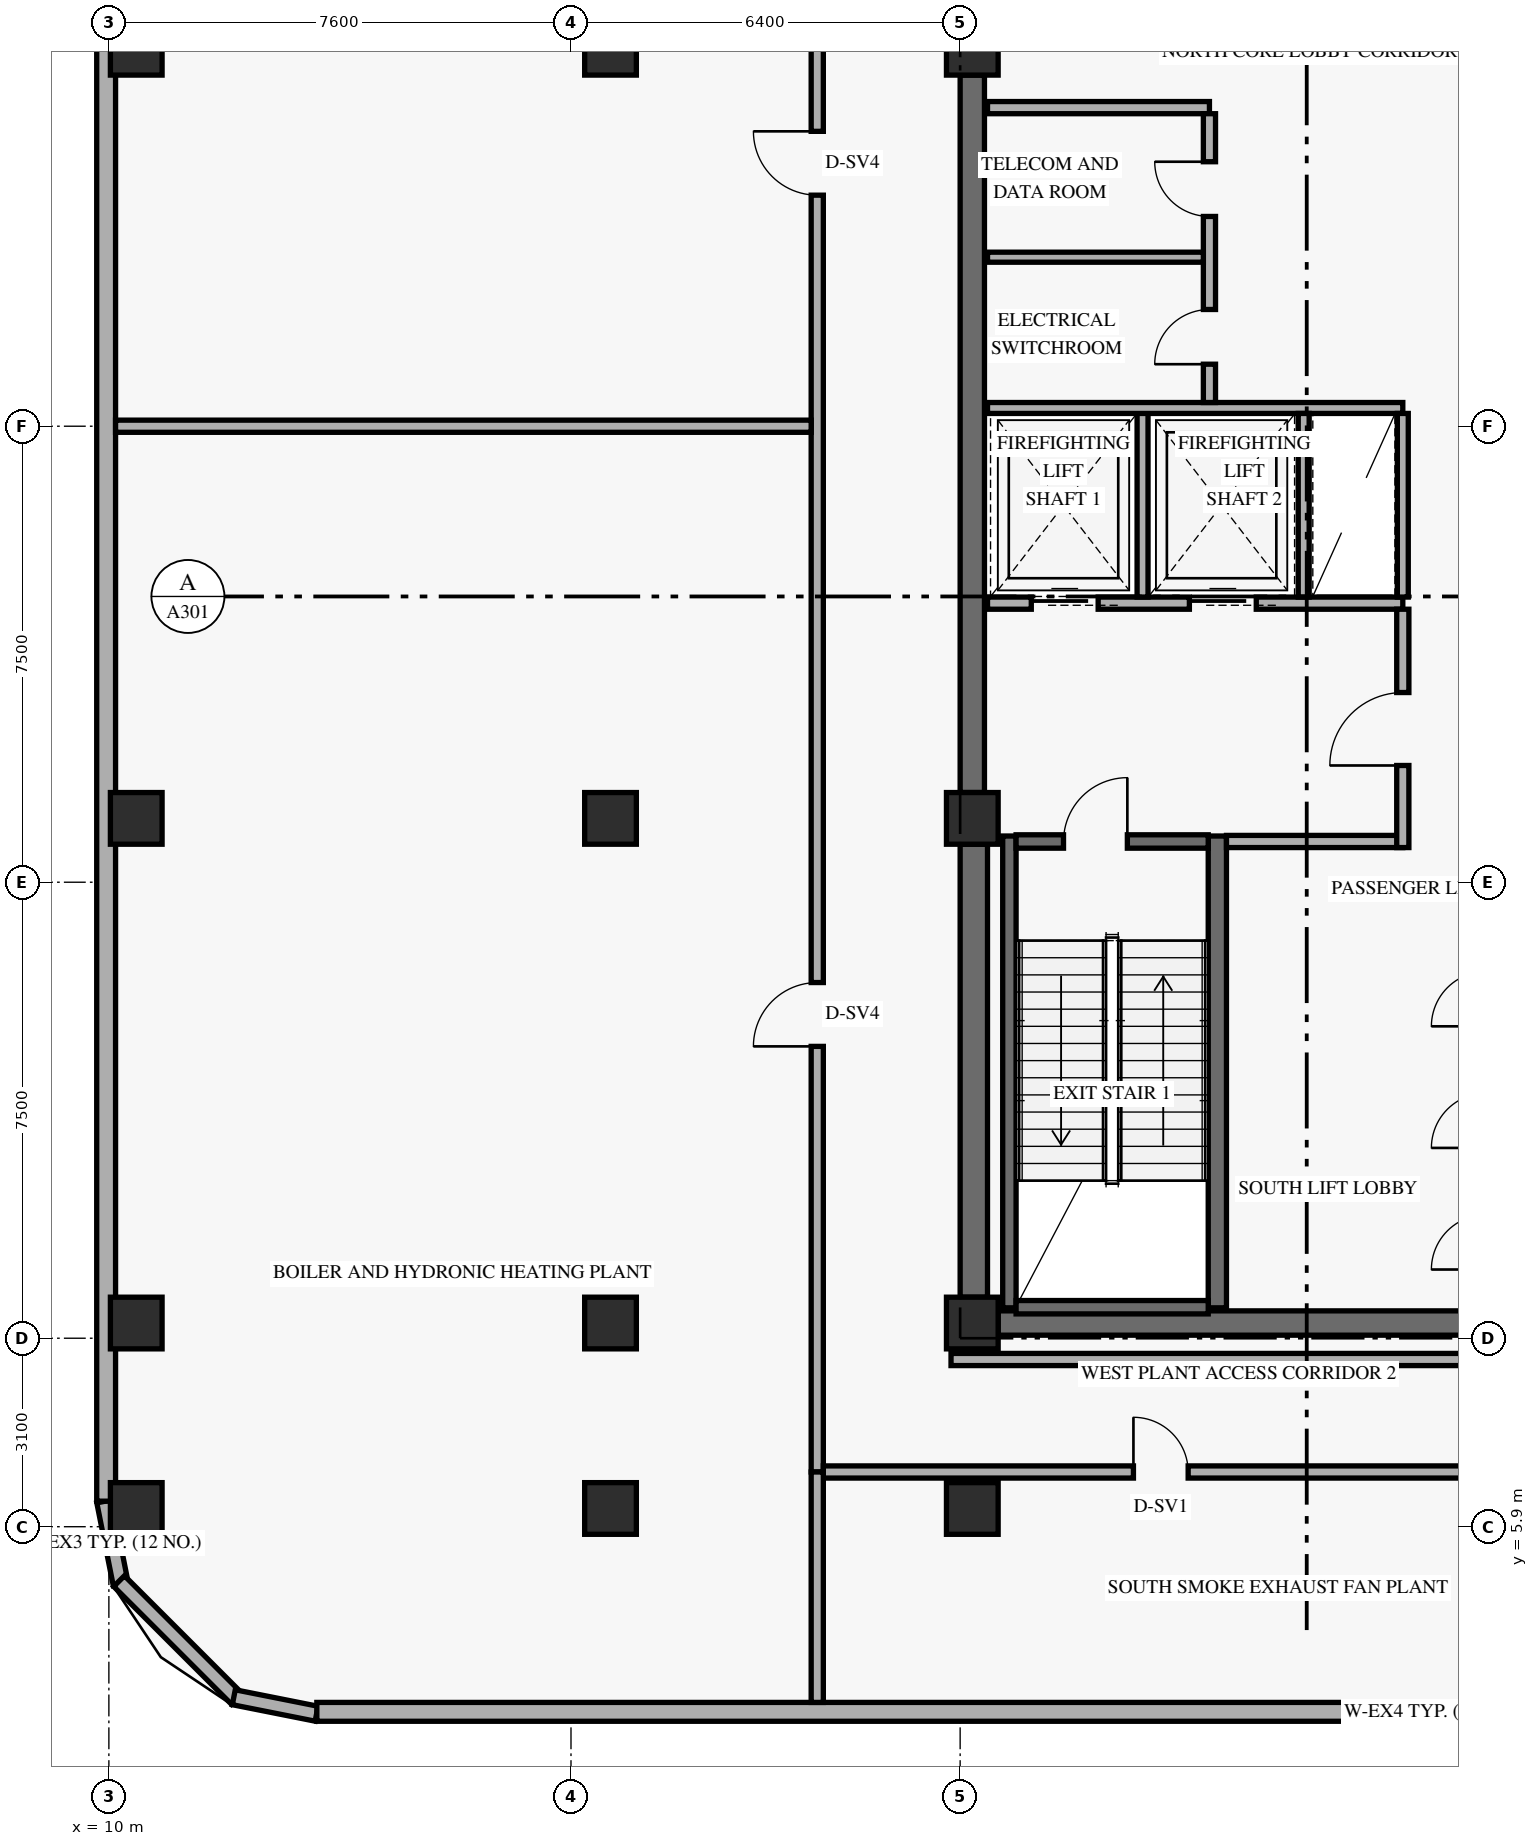
"""IFC4 building model, lengths in metres.
Left out: names, types, materials, properties, quantities, classifications, styles, units other than length and angle.
Written with IfcOpenShell. Run it as: python <this file> out.ifc"""

import sys

from ifc_helpers import new_model, si_unit, direction, frame, frame_2d, origin, origin_2d, place, context, subcontext, project, spatial, rectangle, extrude, element, fill, save


model = new_model("IFC4")
c1 = context("Model", 3, precision=1e-05, world=origin(), true_north=direction((0.0, 1.0)))
c2 = subcontext(c1, "Body", "Model", "MODEL_VIEW")
j1 = project(units=[si_unit("LENGTHUNIT", "METRE"), si_unit("PLANEANGLEUNIT", "RADIAN")], contexts=[c1])
p1 = place(None, origin())
s1 = spatial("IfcSite", under=j1, at=p1, CompositionType="ELEMENT")
p2 = place(p1, origin())
s2 = spatial("IfcBuilding", under=s1, at=p2, CompositionType="ELEMENT")
p3 = place(p2, frame((0.0, 0.0, 135.6)))
s3 = spatial("IfcBuildingStorey", under=s2, at=p3, CompositionType="ELEMENT", Elevation=135.6)
p4 = place(p3, frame((24.225, 9.675, 0.0), z_axis=(0.0, 0.0, 1.0), x_axis=(0.0, 1.0, 0.0)))
e1 = element("IfcWall", 1, at=p4, inside=s3, PredefinedType="SHEAR", context=c2, shape_type="SweptSolid", body=[
    extrude(rectangle(XDim=7.45, YDim=0.45, at=frame_2d((3.725, 0.0))), origin(), (0.0, 0.0, 1.0), 4.549),
])
p5 = place(p3, frame((24.2, 17.975, 0.0), z_axis=(0.0, 0.0, 1.0), x_axis=(0.0, 1.0, 0.0)))
e2 = element("IfcWall", 2, at=p5, inside=s3, PredefinedType="SHEAR", context=c2, shape_type="SweptSolid", body=[
    extrude(rectangle(XDim=11.8, YDim=0.4, at=frame_2d((5.9, 0.0))), origin(), (0.0, 0.0, 1.0), 4.549),
])
p6 = place(p3, frame((24.625, 9.25, 0.0), z_axis=(0.0, 0.0, 1.0), x_axis=(1.0, 0.0, 0.0)))
e3 = element("IfcWall", 3, at=p6, inside=s3, PredefinedType="SHEAR", context=c2, shape_type="SweptSolid", body=[
    extrude(rectangle(XDim=10.15, YDim=0.4, at=frame_2d((5.075, 0.0))), origin(), (0.0, 0.0, 1.0), 5.16),
])
p7 = place(p3, frame((24.81, 9.5, 0.0), z_axis=(0.0, 0.0, 1.0), x_axis=(0.0, 1.0, 0.0)))
e4 = element("IfcWall", 4, at=p7, inside=s3, PredefinedType="SHEAR", context=c2, shape_type="SweptSolid", body=[
    extrude(rectangle(XDim=7.76, YDim=0.22, at=frame_2d((3.88, 0.0))), origin(), (0.0, 0.0, 1.0), 5.16),
])
p8 = place(p3, frame((28.23, 9.5, 0.0), z_axis=(0.0, 0.0, 1.0), x_axis=(0.0, 1.0, 0.0)))
e5 = element("IfcWall", 5, at=p8, inside=s3, PredefinedType="SHEAR", context=c2, shape_type="SweptSolid", body=[
    extrude(rectangle(XDim=7.76, YDim=0.3, at=frame_2d((3.88, 0.0))), origin(), (0.0, 0.0, 1.0), 5.16),
])
p9 = place(p3, frame((24.92, 9.51, 0.0), z_axis=(0.0, 0.0, 1.0), x_axis=(1.0, 0.0, 0.0)))
e6 = element("IfcWall", 6, at=p9, inside=s3, PredefinedType="SHEAR", context=c2, shape_type="SweptSolid", body=[
    extrude(rectangle(XDim=3.16, YDim=0.22, at=frame_2d((1.58, 0.0))), origin(), (0.0, 0.0, 1.0), 5.16),
])
p10 = place(p3, frame((24.92, 17.17, 0.0), z_axis=(0.0, 0.0, 1.0), x_axis=(1.0, 0.0, 0.0)))
e7 = element("IfcWall", 7, at=p10, inside=s3, PredefinedType="SHEAR", context=c2, shape_type="SweptSolid", body=[
    extrude(rectangle(XDim=3.16, YDim=0.22, at=frame_2d((1.58, 0.0))), origin(), (0.0, 0.0, 1.0), 5.16),
])
p11 = place(p10, frame((0.78, 0.0, 0.0)))
e8 = element("IfcOpeningElement", 8, at=p11, cuts=e7, PredefinedType="OPENING", context=c2, shape_type="SweptSolid", body=[
    extrude(rectangle(XDim=1.05, YDim=2.15, at=frame_2d((0.525, 1.075))), frame((0.0, 0.12, 0.0), z_axis=(0.0, -1.0, 0.0), x_axis=(1.0, 0.0, 0.0)), (0.0, 0.0, 1.0), 0.24),
])
for number, where, z_axis, x_axis in (
    (9, (10.45, 6.2, 0.0), (0.0, 0.0, 1.0), (1.0, 0.0, 0.0)),
    (10, (10.45, 9.25, 0.0), (0.0, 0.0, 1.0), (1.0, 0.0, 0.0)),
    (11, (10.45, 17.55, 0.0), (0.0, 0.0, 1.0), (1.0, 0.0, 0.0)),
    (12, (10.45, 30.2, 0.0), (0.0, 0.0, 1.0), (1.0, 0.0, 0.0)),
    (13, (18.25, 6.2, 0.0), (0.0, 0.0, 1.0), (1.0, 0.0, 0.0)),
    (14, (18.25, 9.25, 0.0), (0.0, 0.0, 1.0), (1.0, 0.0, 0.0)),
    (15, (18.25, 17.55, 0.0), (0.0, 0.0, 1.0), (1.0, 0.0, 0.0)),
    (16, (18.25, 30.2, 0.0), (0.0, 0.0, 1.0), (1.0, 0.0, 0.0)),
    (17, (24.2, 6.2, 0.0), (0.0, 0.0, 1.0), (1.0, 0.0, 0.0)),
    (18, (24.2, 9.25, 0.0), (0.0, 0.0, 1.0), (1.0, 0.0, 0.0)),
    (19, (24.2, 17.55, 0.0), (0.0, 0.0, 1.0), (1.0, 0.0, 0.0)),
    (20, (24.2, 30.2, 0.0), (0.0, 0.0, 1.0), (1.0, 0.0, 0.0)),
):
    element("IfcColumn", number, at=place(p3, frame(where, z_axis=z_axis, x_axis=x_axis)), inside=s3, PredefinedType="COLUMN", context=c2, shape_type="SweptSolid", body=[
        extrude(rectangle(XDim=0.85, YDim=0.85, at=origin_2d()), origin(), (0.0, 0.0, 1.0), 5.4),
    ])
p12 = place(p3, frame((9.924, 6.316, 0.0), z_axis=(0.0, 0.0, 1.0), x_axis=(0.195000137217, -0.980803214965, 0.0)))
e21 = element("IfcWall", 21, at=p12, inside=s3, PredefinedType="SOLIDWALL", context=c2, shape_type="SweptSolid", body=[
    extrude(rectangle(XDim=1.388, YDim=0.25, at=frame_2d((0.694, 0.0))), origin(), (0.0, 0.0, 1.0), 5.16),
])
p13 = place(p3, frame((10.168, 5.005, 0.0), z_axis=(0.0, 0.0, 1.0), x_axis=(0.707151344399, -0.707062215165, 0.0)))
e22 = element("IfcWall", 22, at=p13, inside=s3, PredefinedType="SOLIDWALL", context=c2, shape_type="SweptSolid", body=[
    extrude(rectangle(XDim=2.739, YDim=0.25, at=frame_2d((1.37, 0.0))), origin(), (0.0, 0.0, 1.0), 5.16),
])
p14 = place(p3, frame((12.054, 3.095, 0.0), z_axis=(0.0, 0.0, 1.0), x_axis=(0.980809899341, -0.19496651342, 0.0)))
e23 = element("IfcWall", 23, at=p14, inside=s3, PredefinedType="SOLIDWALL", context=c2, shape_type="SweptSolid", body=[
    extrude(rectangle(XDim=1.389, YDim=0.25, at=frame_2d((0.694, 0.0))), origin(), (0.0, 0.0, 1.0), 5.16),
])
p15 = place(p3, frame((13.42, 2.855, 0.0), z_axis=(0.0, 0.0, 1.0), x_axis=(1.0, 0.0, 0.0)))
e24 = element("IfcWall", 24, at=p15, inside=s3, PredefinedType="SOLIDWALL", context=c2, shape_type="SweptSolid", body=[
    extrude(rectangle(XDim=36.56, YDim=0.31, at=frame_2d((18.28, 0.0))), origin(), (0.0, 0.0, 1.0), 5.16),
])
p16 = place(p3, frame((9.955, 41.68, 0.0), z_axis=(0.0, 0.0, 1.0), x_axis=(0.0, -1.0, 0.0)))
e25 = element("IfcWall", 25, at=p16, inside=s3, PredefinedType="SOLIDWALL", context=c2, shape_type="SweptSolid", body=[
    extrude(rectangle(XDim=35.36, YDim=0.31, at=frame_2d((17.68, 0.0))), origin(), (0.0, 0.0, 1.0), 5.16),
])
p17 = place(p3, frame((24.45, 21.09, 0.0), z_axis=(0.0, 0.0, 1.0), x_axis=(1.0, 0.0, 0.0)))
e26 = element("IfcWall", 26, at=p17, inside=s3, PredefinedType="STANDARD", context=c2, shape_type="SweptSolid", body=[
    extrude(rectangle(XDim=6.83, YDim=0.2, at=frame_2d((3.415, 0.0))), origin(), (0.0, 0.0, 1.0), 5.16),
])
p18 = place(p17, frame((0.72, 0.0, 0.0)))
e27 = element("IfcOpeningElement", 27, at=p18, cuts=e26, PredefinedType="OPENING", context=c2, shape_type="SweptSolid", body=[
    extrude(rectangle(XDim=1.1, YDim=2.2, at=frame_2d((0.55, 1.1))), frame((0.0, 0.11, 0.0), z_axis=(0.0, -1.0, 0.0), x_axis=(1.0, 0.0, 0.0)), (0.0, 0.0, 1.0), 0.22),
])
p19 = place(p17, frame((3.32, 0.0, 0.0)))
e28 = element("IfcOpeningElement", 28, at=p19, cuts=e26, PredefinedType="OPENING", context=c2, shape_type="SweptSolid", body=[
    extrude(rectangle(XDim=1.1, YDim=2.2, at=frame_2d((0.55, 1.1))), frame((0.0, 0.11, 0.0), z_axis=(0.0, -1.0, 0.0), x_axis=(1.0, 0.0, 0.0)), (0.0, 0.0, 1.0), 0.22),
])
p20 = place(p3, frame((28.38, 17.17, 0.0), z_axis=(0.0, 0.0, 1.0), x_axis=(1.0, 0.0, 0.0)))
e29 = element("IfcWall", 29, at=p20, inside=s3, PredefinedType="STANDARD", context=c2, shape_type="SweptSolid", body=[
    extrude(rectangle(XDim=2.9, YDim=0.2, at=frame_2d((1.45, 0.0))), origin(), (0.0, 0.0, 1.0), 5.16),
])
p21 = place(p3, frame((31.28, 17.07, 0.0), z_axis=(0.0, 0.0, 1.0), x_axis=(0.0, 1.0, 0.0)))
e30 = element("IfcWall", 30, at=p21, inside=s3, PredefinedType="STANDARD", context=c2, shape_type="SweptSolid", body=[
    extrude(rectangle(XDim=3.92, YDim=0.2, at=frame_2d((1.96, 0.0))), origin(), (0.0, 0.0, 1.0), 4.531),
])
p22 = place(p21, frame((1.35, 0.0, 0.0)))
e31 = element("IfcOpeningElement", 31, at=p22, cuts=e30, PredefinedType="OPENING", context=c2, shape_type="SweptSolid", body=[
    extrude(rectangle(XDim=1.2, YDim=2.15, at=frame_2d((0.6, 1.075))), frame((0.0, 0.11, 0.0), z_axis=(0.0, -1.0, 0.0), x_axis=(1.0, 0.0, 0.0)), (0.0, 0.0, 1.0), 0.22),
])
p23 = place(p3, frame((27.0, 21.19, 0.0), z_axis=(0.0, 0.0, 1.0), x_axis=(0.0, 1.0, 0.0)))
e32 = element("IfcWall", 32, at=p23, inside=s3, PredefinedType="STANDARD", context=c2, shape_type="SweptSolid", body=[
    extrude(rectangle(XDim=3.11, YDim=0.18, at=frame_2d((1.555, 0.0))), origin(), (0.0, 0.0, 1.0), 5.16),
])
p24 = place(p3, frame((24.45, 24.3, 0.0), z_axis=(0.0, 0.0, 1.0), x_axis=(1.0, 0.0, 0.0)))
e33 = element("IfcWall", 33, at=p24, inside=s3, PredefinedType="STANDARD", context=c2, shape_type="SweptSolid", body=[
    extrude(rectangle(XDim=6.83, YDim=0.18, at=frame_2d((3.415, 0.0))), origin(), (0.0, 0.0, 1.0), 5.16),
])
for number, where, z_axis, x_axis in (
    (34, (29.65, 21.19, 0.0), (0.0, 0.0, 1.0), (0.0, 1.0, 0.0)),
    (35, (31.28, 21.19, 0.0), (0.0, 0.0, 1.0), (0.0, 1.0, 0.0)),
):
    element("IfcWall", number, at=place(p3, frame(where, z_axis=z_axis, x_axis=x_axis)), inside=s3, PredefinedType="STANDARD", context=c2, shape_type="SweptSolid", body=[
        extrude(rectangle(XDim=3.02, YDim=0.18, at=frame_2d((1.51, 0.0))), origin(), (0.0, 0.0, 1.0), 5.16),
    ])
p25 = place(p3, frame((24.45, 29.24, 0.0), z_axis=(0.0, 0.0, 1.0), x_axis=(1.0, 0.0, 0.0)))
e36 = element("IfcWall", 36, at=p25, inside=s3, PredefinedType="STANDARD", context=c2, shape_type="SweptSolid", body=[
    extrude(rectangle(XDim=3.65, YDim=0.2, at=frame_2d((1.825, 0.0))), origin(), (0.0, 0.0, 1.0), 5.16),
])
p26 = place(p3, frame((28.1, 24.39, 0.0), z_axis=(0.0, 0.0, 1.0), x_axis=(0.0, 1.0, 0.0)))
e37 = element("IfcWall", 37, at=p26, inside=s3, PredefinedType="STANDARD", context=c2, shape_type="SweptSolid", body=[
    extrude(rectangle(XDim=4.75, YDim=0.2, at=frame_2d((2.375, 0.0))), origin(), (0.0, 0.0, 1.0), 5.16),
])
p27 = place(p26, frame((0.63, 0.0, 0.0)))
e38 = element("IfcOpeningElement", 38, at=p27, cuts=e37, PredefinedType="OPENING", context=c2, shape_type="SweptSolid", body=[
    extrude(rectangle(XDim=0.9, YDim=2.1, at=frame_2d((0.45, 1.05))), frame((0.0, 0.11, 0.0), z_axis=(0.0, -1.0, 0.0), x_axis=(1.0, 0.0, 0.0)), (0.0, 0.0, 1.0), 0.22),
])
p28 = place(p26, frame((3.06, 0.0, 0.0)))
e39 = element("IfcOpeningElement", 39, at=p28, cuts=e37, PredefinedType="OPENING", context=c2, shape_type="SweptSolid", body=[
    extrude(rectangle(XDim=0.9, YDim=2.1, at=frame_2d((0.45, 1.05))), frame((0.0, 0.11, 0.0), z_axis=(0.0, -1.0, 0.0), x_axis=(1.0, 0.0, 0.0)), (0.0, 0.0, 1.0), 0.22),
])
p29 = place(p3, frame((24.45, 26.78, 0.0), z_axis=(0.0, 0.0, 1.0), x_axis=(1.0, 0.0, 0.0)))
e40 = element("IfcWall", 40, at=p29, inside=s3, PredefinedType="PARTITIONING", context=c2, shape_type="SweptSolid", body=[
    extrude(rectangle(XDim=3.55, YDim=0.165, at=frame_2d((1.775, 0.0))), origin(), (0.0, 0.0, 1.0), 5.16),
])
p30 = place(p3, frame((21.65, 6.8, 0.0), z_axis=(0.0, 0.0, 1.0), x_axis=(0.0, 1.0, 0.0)))
e41 = element("IfcWall", 41, at=p30, inside=s3, PredefinedType="STANDARD", context=c2, shape_type="SweptSolid", body=[
    extrude(rectangle(XDim=34.4, YDim=0.2, at=frame_2d((17.2, 0.0))), origin(), (0.0, 0.0, 1.0), 4.531),
])
p31 = place(p30, frame((7.0, 0.0, 0.0)))
e42 = element("IfcOpeningElement", 42, at=p31, cuts=e41, PredefinedType="OPENING", context=c2, shape_type="SweptSolid", body=[
    extrude(rectangle(XDim=1.05, YDim=2.15, at=frame_2d((0.525, 1.075))), frame((0.0, 0.11, 0.0), z_axis=(0.0, -1.0, 0.0), x_axis=(1.0, 0.0, 0.0)), (0.0, 0.0, 1.0), 0.22),
])
p32 = place(p30, frame((21.0, 0.0, 0.0)))
e43 = element("IfcOpeningElement", 43, at=p32, cuts=e41, PredefinedType="OPENING", context=c2, shape_type="SweptSolid", body=[
    extrude(rectangle(XDim=1.05, YDim=2.15, at=frame_2d((0.525, 1.075))), frame((0.0, 0.11, 0.0), z_axis=(0.0, -1.0, 0.0), x_axis=(1.0, 0.0, 0.0)), (0.0, 0.0, 1.0), 0.22),
])
p33 = place(p3, frame((21.75, 6.8, 0.0), z_axis=(0.0, 0.0, 1.0), x_axis=(1.0, 0.0, 0.0)))
e44 = element("IfcWall", 44, at=p33, inside=s3, PredefinedType="STANDARD", context=c2, shape_type="SweptSolid", body=[
    extrude(rectangle(XDim=15.6, YDim=0.2, at=frame_2d((7.8, 0.0))), origin(), (0.0, 0.0, 1.0), 4.531),
])
p34 = place(p33, frame((5.1, 0.0, 0.0)))
e45 = element("IfcOpeningElement", 45, at=p34, cuts=e44, PredefinedType="OPENING", context=c2, shape_type="SweptSolid", body=[
    extrude(rectangle(XDim=0.9, YDim=2.1, at=frame_2d((0.45, 1.05))), frame((0.0, 0.11, 0.0), z_axis=(0.0, -1.0, 0.0), x_axis=(1.0, 0.0, 0.0)), (0.0, 0.0, 1.0), 0.22),
])
p35 = place(p3, frame((23.85, 8.65, 0.0), z_axis=(0.0, 0.0, 1.0), x_axis=(1.0, 0.0, 0.0)))
e46 = element("IfcWall", 46, at=p35, inside=s3, PredefinedType="STANDARD", context=c2, shape_type="SweptSolid", body=[
    extrude(rectangle(XDim=11.47, YDim=0.2, at=frame_2d((5.735, 0.0))), origin(), (0.0, 0.0, 1.0), 4.531),
])
p36 = place(p3, frame((21.65, 3.01, 0.0), z_axis=(0.0, 0.0, 1.0), x_axis=(0.0, 1.0, 0.0)))
e47 = element("IfcWall", 47, at=p36, inside=s3, PredefinedType="STANDARD", context=c2, shape_type="SweptSolid", body=[
    extrude(rectangle(XDim=3.79, YDim=0.2, at=frame_2d((1.895, 0.0))), origin(), (0.0, 0.0, 1.0), 4.609),
])
p37 = place(p3, frame((10.11, 24.0, 0.0), z_axis=(0.0, 0.0, 1.0), x_axis=(1.0, 0.0, 0.0)))
e48 = element("IfcWall", 48, at=p37, inside=s3, PredefinedType="STANDARD", context=c2, shape_type="SweptSolid", body=[
    extrude(rectangle(XDim=11.44, YDim=0.2, at=frame_2d((5.72, 0.0))), origin(), (0.0, 0.0, 1.0), 4.531),
])
p38 = place(p11, frame((1.05, 0.0, 0.0), z_axis=(0.0, 0.0, 1.0), x_axis=(-1.0, 0.0, 0.0)))
e49 = element("IfcDoor", 49, at=p38, inside=s3, OperationType="SINGLE_SWING_LEFT", PredefinedType="DOOR", context=c2, shape_type="SweptSolid", body=[
    extrude(rectangle(XDim=1.05, YDim=2.15, at=frame_2d((0.525, 1.075))), frame((0.0, 0.025, 0.0), z_axis=(0.0, -1.0, 0.0), x_axis=(1.0, 0.0, 0.0)), (0.0, 0.0, 1.0), 0.05),
])
fill(e8, e49)
p39 = place(p18, origin())
e50 = element("IfcDoor", 50, at=p39, inside=s3, OperationType="SLIDING_TO_LEFT", PredefinedType="DOOR", context=c2, shape_type="SweptSolid", body=[
    extrude(rectangle(XDim=1.1, YDim=2.2, at=frame_2d((0.55, 1.1))), frame((0.0, 0.025, 0.0), z_axis=(0.0, -1.0, 0.0), x_axis=(1.0, 0.0, 0.0)), (0.0, 0.0, 1.0), 0.05),
])
fill(e27, e50)
p40 = place(p19, origin())
e51 = element("IfcDoor", 51, at=p40, inside=s3, OperationType="SLIDING_TO_LEFT", PredefinedType="DOOR", context=c2, shape_type="SweptSolid", body=[
    extrude(rectangle(XDim=1.1, YDim=2.2, at=frame_2d((0.55, 1.1))), frame((0.0, 0.025, 0.0), z_axis=(0.0, -1.0, 0.0), x_axis=(1.0, 0.0, 0.0)), (0.0, 0.0, 1.0), 0.05),
])
fill(e28, e51)
p41 = place(p22, origin())
e52 = element("IfcDoor", 52, at=p41, inside=s3, OperationType="SINGLE_SWING_LEFT", PredefinedType="DOOR", context=c2, shape_type="SweptSolid", body=[
    extrude(rectangle(XDim=1.2, YDim=2.15, at=frame_2d((0.6, 1.075))), frame((0.0, 0.025, 0.0), z_axis=(0.0, -1.0, 0.0), x_axis=(1.0, 0.0, 0.0)), (0.0, 0.0, 1.0), 0.05),
])
fill(e31, e52)
p42 = place(p27, origin())
e53 = element("IfcDoor", 53, at=p42, inside=s3, OperationType="SINGLE_SWING_LEFT", PredefinedType="DOOR", context=c2, shape_type="SweptSolid", body=[
    extrude(rectangle(XDim=0.9, YDim=2.1, at=frame_2d((0.45, 1.05))), frame((0.0, 0.025, 0.0), z_axis=(0.0, -1.0, 0.0), x_axis=(1.0, 0.0, 0.0)), (0.0, 0.0, 1.0), 0.05),
])
fill(e38, e53)
p43 = place(p28, origin())
e54 = element("IfcDoor", 54, at=p43, inside=s3, OperationType="SINGLE_SWING_RIGHT", PredefinedType="DOOR", context=c2, shape_type="SweptSolid", body=[
    extrude(rectangle(XDim=0.9, YDim=2.1, at=frame_2d((0.45, 1.05))), frame((0.0, 0.025, 0.0), z_axis=(0.0, -1.0, 0.0), x_axis=(1.0, 0.0, 0.0)), (0.0, 0.0, 1.0), 0.05),
])
fill(e39, e54)
p44 = place(p31, origin())
e55 = element("IfcDoor", 55, at=p44, inside=s3, OperationType="SINGLE_SWING_LEFT", PredefinedType="DOOR", context=c2, shape_type="SweptSolid", body=[
    extrude(rectangle(XDim=1.05, YDim=2.15, at=frame_2d((0.525, 1.075))), frame((0.0, 0.025, 0.0), z_axis=(0.0, -1.0, 0.0), x_axis=(1.0, 0.0, 0.0)), (0.0, 0.0, 1.0), 0.05),
])
fill(e42, e55)
p45 = place(p32, origin())
e56 = element("IfcDoor", 56, at=p45, inside=s3, OperationType="SINGLE_SWING_RIGHT", PredefinedType="DOOR", context=c2, shape_type="SweptSolid", body=[
    extrude(rectangle(XDim=1.05, YDim=2.15, at=frame_2d((0.525, 1.075))), frame((0.0, 0.025, 0.0), z_axis=(0.0, -1.0, 0.0), x_axis=(1.0, 0.0, 0.0)), (0.0, 0.0, 1.0), 0.05),
])
fill(e43, e56)
p46 = place(p34, origin())
e57 = element("IfcDoor", 57, at=p46, inside=s3, OperationType="SINGLE_SWING_LEFT", PredefinedType="DOOR", context=c2, shape_type="SweptSolid", body=[
    extrude(rectangle(XDim=0.9, YDim=2.1, at=frame_2d((0.45, 1.05))), frame((0.0, 0.025, 0.0), z_axis=(0.0, -1.0, 0.0), x_axis=(1.0, 0.0, 0.0)), (0.0, 0.0, 1.0), 0.05),
])
fill(e45, e57)
save(model, sys.argv[1])
